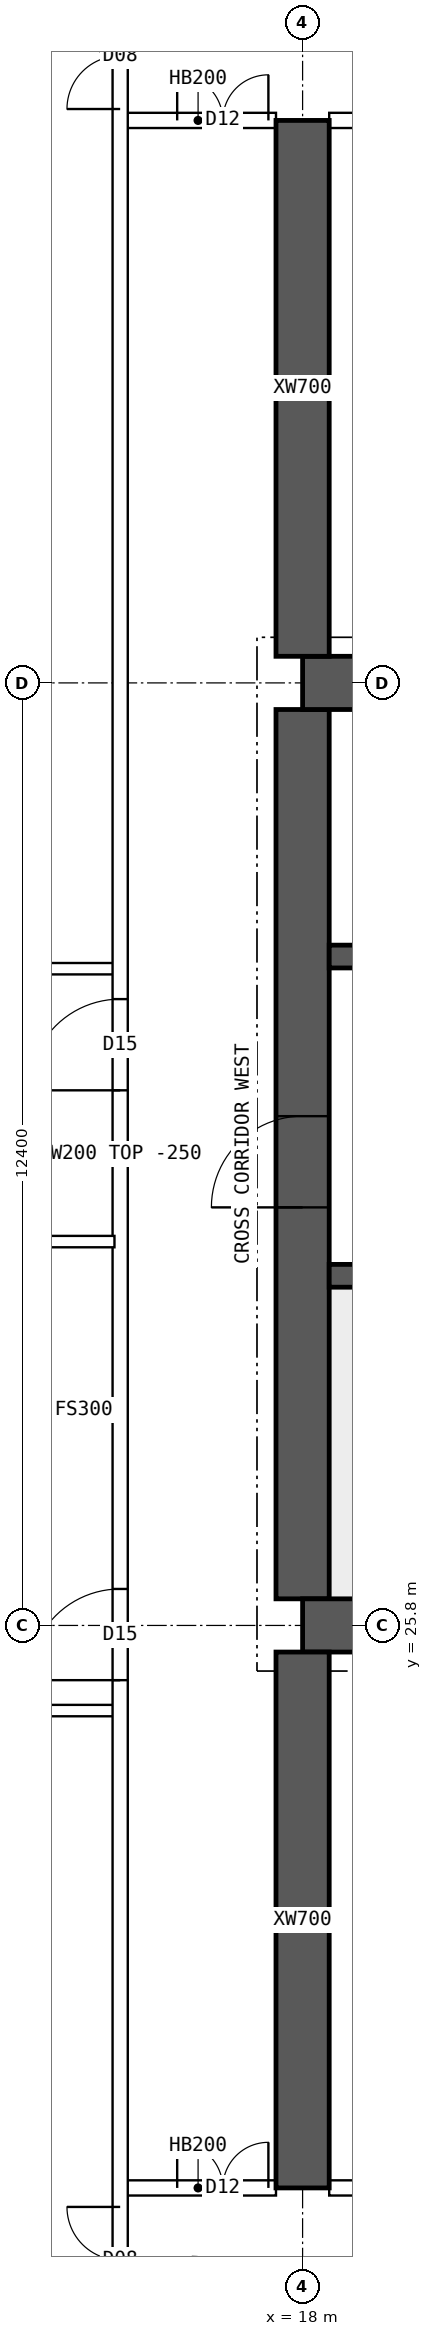
"""IFC4 building model, lengths in metres.
Left out: names, types, materials, properties, quantities, classifications, styles, units other than length and angle.
Written with IfcOpenShell. Run it as: python <this file> out.ifc"""

import sys

from ifc_helpers import new_model, si_unit, direction, frame, frame_2d, origin, place, context, subcontext, project, spatial, polyline, rectangle, outline, extrude, element, fill, save


model = new_model("IFC4")
c1 = context("Model", 3, precision=1e-05, world=origin(), true_north=direction((0.0, 1.0)))
c2 = subcontext(c1, "Body", "Model", "MODEL_VIEW")
j1 = project(units=[si_unit("LENGTHUNIT", "METRE"), si_unit("PLANEANGLEUNIT", "RADIAN")], contexts=[c1])
p1 = place(None, origin())
s1 = spatial("IfcSite", under=j1, at=p1, CompositionType="ELEMENT")
p2 = place(p1, origin())
s2 = spatial("IfcBuilding", under=s1, at=p2, CompositionType="ELEMENT")
p3 = place(p2, frame((0.0, 0.0, 208.3)))
s3 = spatial("IfcBuildingStorey", under=s2, at=p3, CompositionType="ELEMENT", Elevation=208.3)
for number, where, z_axis, x_axis in (
    (1, (18.0, 25.8, 0.0), (0.0, 0.0, 1.0), (1.0, 0.0, 0.0)),
    (2, (18.0, 38.2, 0.0), (0.0, 0.0, 1.0), (1.0, 0.0, 0.0)),
):
    element("IfcWall", number, at=place(p3, frame(where, z_axis=z_axis, x_axis=x_axis)), inside=s3, PredefinedType="SHEAR", context=c2, shape_type="SweptSolid", body=[
        extrude(rectangle(XDim=48.0, YDim=0.7, at=frame_2d((24.0, 0.0))), origin(), (0.0, 0.0, 1.0), 4.5),
    ])
p4 = place(p3, frame((18.0, 26.15, 0.0), z_axis=(0.0, 0.0, 1.0), x_axis=(0.0, 1.0, 0.0)))
e3 = element("IfcWall", 3, at=p4, inside=s3, PredefinedType="SHEAR", context=c2, shape_type="SweptSolid", body=[
    extrude(rectangle(XDim=11.7, YDim=0.7, at=frame_2d((5.85, 0.0))), origin(), (0.0, 0.0, 1.0), 4.5),
])
p5 = place(p4, frame((5.15, 0.0, 0.0)))
e4 = element("IfcOpeningElement", 4, at=p5, cuts=e3, PredefinedType="OPENING", context=c2, shape_type="SweptSolid", body=[
    extrude(rectangle(XDim=1.2, YDim=2.1, at=frame_2d((0.6, 1.05))), frame((0.0, 0.36, 0.0), z_axis=(0.0, -1.0, 0.0), x_axis=(1.0, 0.0, 0.0)), (0.0, 0.0, 1.0), 0.72),
])
p6 = place(p3, frame((18.35, 30.4, 0.0), z_axis=(0.0, 0.0, 1.0), x_axis=(1.0, 0.0, 0.0)))
e5 = element("IfcWall", 5, at=p6, inside=s3, PredefinedType="SHEAR", context=c2, shape_type="SweptSolid", body=[
    extrude(rectangle(XDim=47.3, YDim=0.3, at=frame_2d((23.65, 0.0))), origin(), (0.0, 0.0, 1.0), 4.5),
])
p7 = place(p6, frame((0.4, 0.0, 0.0)))
e6 = element("IfcOpeningElement", 6, at=p7, cuts=e5, PredefinedType="OPENING", context=c2, shape_type="SweptSolid", body=[
    extrude(rectangle(XDim=1.0, YDim=2.1, at=frame_2d((0.5, 1.05))), frame((0.0, 0.16, 0.0), z_axis=(0.0, -1.0, 0.0), x_axis=(1.0, 0.0, 0.0)), (0.0, 0.0, 1.0), 0.32),
])
p8 = place(p6, frame((45.9, 0.0, 0.0)))
e7 = element("IfcOpeningElement", 7, at=p8, cuts=e5, PredefinedType="OPENING", context=c2, shape_type="SweptSolid", body=[
    extrude(rectangle(XDim=1.0, YDim=2.1, at=frame_2d((0.5, 1.05))), frame((0.0, 0.16, 0.0), z_axis=(0.0, -1.0, 0.0), x_axis=(1.0, 0.0, 0.0)), (0.0, 0.0, 1.0), 0.32),
])
p9 = place(p6, frame((8.4, 0.0, 0.0)))
e8 = element("IfcOpeningElement", 8, at=p9, cuts=e5, PredefinedType="OPENING", context=c2, shape_type="SweptSolid", body=[
    extrude(rectangle(XDim=1.1, YDim=2.1, at=frame_2d((0.55, 1.05))), frame((0.0, 0.16, 0.0), z_axis=(0.0, -1.0, 0.0), x_axis=(1.0, 0.0, 0.0)), (0.0, 0.0, 1.0), 0.32),
])
p10 = place(p6, frame((11.0, 0.0, 0.0)))
e9 = element("IfcOpeningElement", 9, at=p10, cuts=e5, PredefinedType="OPENING", context=c2, shape_type="SweptSolid", body=[
    extrude(rectangle(XDim=1.1, YDim=2.1, at=frame_2d((0.55, 1.05))), frame((0.0, 0.16, 0.0), z_axis=(0.0, -1.0, 0.0), x_axis=(1.0, 0.0, 0.0)), (0.0, 0.0, 1.0), 0.32),
])
p11 = place(p6, frame((13.6, 0.0, 0.0)))
e10 = element("IfcOpeningElement", 10, at=p11, cuts=e5, PredefinedType="OPENING", context=c2, shape_type="SweptSolid", body=[
    extrude(rectangle(XDim=1.1, YDim=2.1, at=frame_2d((0.55, 1.05))), frame((0.0, 0.16, 0.0), z_axis=(0.0, -1.0, 0.0), x_axis=(1.0, 0.0, 0.0)), (0.0, 0.0, 1.0), 0.32),
])
p12 = place(p6, frame((16.2, 0.0, 0.0)))
e11 = element("IfcOpeningElement", 11, at=p12, cuts=e5, PredefinedType="OPENING", context=c2, shape_type="SweptSolid", body=[
    extrude(rectangle(XDim=1.1, YDim=2.1, at=frame_2d((0.55, 1.05))), frame((0.0, 0.16, 0.0), z_axis=(0.0, -1.0, 0.0), x_axis=(1.0, 0.0, 0.0)), (0.0, 0.0, 1.0), 0.32),
])
p13 = place(p6, frame((18.975, 0.0, 0.0)))
e12 = element("IfcOpeningElement", 12, at=p13, cuts=e5, PredefinedType="OPENING", context=c2, shape_type="SweptSolid", body=[
    extrude(rectangle(XDim=0.9, YDim=2.1, at=frame_2d((0.45, 1.05))), frame((0.0, 0.16, 0.0), z_axis=(0.0, -1.0, 0.0), x_axis=(1.0, 0.0, 0.0)), (0.0, 0.0, 1.0), 0.32),
])
p14 = place(p6, frame((24.375, 0.0, 0.0)))
e13 = element("IfcOpeningElement", 13, at=p14, cuts=e5, PredefinedType="OPENING", context=c2, shape_type="SweptSolid", body=[
    extrude(rectangle(XDim=1.1, YDim=2.1, at=frame_2d((0.55, 1.05))), frame((0.0, 0.16, 0.0), z_axis=(0.0, -1.0, 0.0), x_axis=(1.0, 0.0, 0.0)), (0.0, 0.0, 1.0), 0.32),
])
p15 = place(p6, frame((27.125, 0.0, 0.0)))
e14 = element("IfcOpeningElement", 14, at=p15, cuts=e5, PredefinedType="OPENING", context=c2, shape_type="SweptSolid", body=[
    extrude(rectangle(XDim=1.1, YDim=2.1, at=frame_2d((0.55, 1.05))), frame((0.0, 0.16, 0.0), z_axis=(0.0, -1.0, 0.0), x_axis=(1.0, 0.0, 0.0)), (0.0, 0.0, 1.0), 0.32),
])
p16 = place(p6, frame((30.267, 0.0, 0.0)))
e15 = element("IfcOpeningElement", 15, at=p16, cuts=e5, PredefinedType="OPENING", context=c2, shape_type="SweptSolid", body=[
    extrude(rectangle(XDim=1.1, YDim=2.1, at=frame_2d((0.55, 1.05))), frame((0.0, 0.16, 0.0), z_axis=(0.0, -1.0, 0.0), x_axis=(1.0, 0.0, 0.0)), (0.0, 0.0, 1.0), 0.32),
])
p17 = place(p6, frame((33.8, 0.0, 0.0)))
e16 = element("IfcOpeningElement", 16, at=p17, cuts=e5, PredefinedType="OPENING", context=c2, shape_type="SweptSolid", body=[
    extrude(rectangle(XDim=1.1, YDim=2.1, at=frame_2d((0.55, 1.05))), frame((0.0, 0.16, 0.0), z_axis=(0.0, -1.0, 0.0), x_axis=(1.0, 0.0, 0.0)), (0.0, 0.0, 1.0), 0.32),
])
p18 = place(p6, frame((37.333, 0.0, 0.0)))
e17 = element("IfcOpeningElement", 17, at=p18, cuts=e5, PredefinedType="OPENING", context=c2, shape_type="SweptSolid", body=[
    extrude(rectangle(XDim=1.1, YDim=2.1, at=frame_2d((0.55, 1.05))), frame((0.0, 0.16, 0.0), z_axis=(0.0, -1.0, 0.0), x_axis=(1.0, 0.0, 0.0)), (0.0, 0.0, 1.0), 0.32),
])
p19 = place(p3, frame((18.35, 34.6, 0.0), z_axis=(0.0, 0.0, 1.0), x_axis=(1.0, 0.0, 0.0)))
e18 = element("IfcWall", 18, at=p19, inside=s3, PredefinedType="SHEAR", context=c2, shape_type="SweptSolid", body=[
    extrude(rectangle(XDim=47.3, YDim=0.3, at=frame_2d((23.65, 0.0))), origin(), (0.0, 0.0, 1.0), 4.5),
])
p20 = place(p19, frame((0.9, 0.0, 0.0)))
e19 = element("IfcOpeningElement", 19, at=p20, cuts=e18, PredefinedType="OPENING", context=c2, shape_type="SweptSolid", body=[
    extrude(rectangle(XDim=1.1, YDim=2.1, at=frame_2d((0.55, 1.05))), frame((0.0, 0.16, 0.0), z_axis=(0.0, -1.0, 0.0), x_axis=(1.0, 0.0, 0.0)), (0.0, 0.0, 1.0), 0.32),
])
p21 = place(p19, frame((45.3, 0.0, 0.0)))
e20 = element("IfcOpeningElement", 20, at=p21, cuts=e18, PredefinedType="OPENING", context=c2, shape_type="SweptSolid", body=[
    extrude(rectangle(XDim=1.1, YDim=2.1, at=frame_2d((0.55, 1.05))), frame((0.0, 0.16, 0.0), z_axis=(0.0, -1.0, 0.0), x_axis=(1.0, 0.0, 0.0)), (0.0, 0.0, 1.0), 0.32),
])
p22 = place(p19, frame((4.25, 0.0, 0.0)))
e21 = element("IfcOpeningElement", 21, at=p22, cuts=e18, PredefinedType="OPENING", context=c2, shape_type="SweptSolid", body=[
    extrude(rectangle(XDim=0.9, YDim=2.1, at=frame_2d((0.45, 1.05))), frame((0.0, 0.16, 0.0), z_axis=(0.0, -1.0, 0.0), x_axis=(1.0, 0.0, 0.0)), (0.0, 0.0, 1.0), 0.32),
])
p23 = place(p19, frame((42.15, 0.0, 0.0)))
e22 = element("IfcOpeningElement", 22, at=p23, cuts=e18, PredefinedType="OPENING", context=c2, shape_type="SweptSolid", body=[
    extrude(rectangle(XDim=0.9, YDim=2.1, at=frame_2d((0.45, 1.05))), frame((0.0, 0.16, 0.0), z_axis=(0.0, -1.0, 0.0), x_axis=(1.0, 0.0, 0.0)), (0.0, 0.0, 1.0), 0.32),
])
p24 = place(p19, frame((9.025, 0.0, 0.0)))
e23 = element("IfcOpeningElement", 23, at=p24, cuts=e18, PredefinedType="OPENING", context=c2, shape_type="SweptSolid", body=[
    extrude(rectangle(XDim=0.9, YDim=2.1, at=frame_2d((0.45, 1.05))), frame((0.0, 0.16, 0.0), z_axis=(0.0, -1.0, 0.0), x_axis=(1.0, 0.0, 0.0)), (0.0, 0.0, 1.0), 0.32),
])
p25 = place(p19, frame((12.999, 0.0, 0.0)))
e24 = element("IfcOpeningElement", 24, at=p25, cuts=e18, PredefinedType="OPENING", context=c2, shape_type="SweptSolid", body=[
    extrude(rectangle(XDim=0.9, YDim=2.1, at=frame_2d((0.45, 1.05))), frame((0.0, 0.16, 0.0), z_axis=(0.0, -1.0, 0.0), x_axis=(1.0, 0.0, 0.0)), (0.0, 0.0, 1.0), 0.32),
])
p26 = place(p19, frame((16.646, 0.0, 0.0)))
e25 = element("IfcOpeningElement", 25, at=p26, cuts=e18, PredefinedType="OPENING", context=c2, shape_type="SweptSolid", body=[
    extrude(rectangle(XDim=0.9, YDim=2.1, at=frame_2d((0.45, 1.05))), frame((0.0, 0.16, 0.0), z_axis=(0.0, -1.0, 0.0), x_axis=(1.0, 0.0, 0.0)), (0.0, 0.0, 1.0), 0.32),
])
p27 = place(p19, frame((20.405, 0.0, 0.0)))
e26 = element("IfcOpeningElement", 26, at=p27, cuts=e18, PredefinedType="OPENING", context=c2, shape_type="SweptSolid", body=[
    extrude(rectangle(XDim=0.9, YDim=2.1, at=frame_2d((0.45, 1.05))), frame((0.0, 0.16, 0.0), z_axis=(0.0, -1.0, 0.0), x_axis=(1.0, 0.0, 0.0)), (0.0, 0.0, 1.0), 0.32),
])
p28 = place(p19, frame((24.811, 0.0, 0.0)))
e27 = element("IfcOpeningElement", 27, at=p28, cuts=e18, PredefinedType="OPENING", context=c2, shape_type="SweptSolid", body=[
    extrude(rectangle(XDim=0.9, YDim=2.1, at=frame_2d((0.45, 1.05))), frame((0.0, 0.16, 0.0), z_axis=(0.0, -1.0, 0.0), x_axis=(1.0, 0.0, 0.0)), (0.0, 0.0, 1.0), 0.32),
])
p29 = place(p19, frame((27.608, 0.0, 0.0)))
e28 = element("IfcOpeningElement", 28, at=p29, cuts=e18, PredefinedType="OPENING", context=c2, shape_type="SweptSolid", body=[
    extrude(rectangle(XDim=0.9, YDim=2.1, at=frame_2d((0.45, 1.05))), frame((0.0, 0.16, 0.0), z_axis=(0.0, -1.0, 0.0), x_axis=(1.0, 0.0, 0.0)), (0.0, 0.0, 1.0), 0.32),
])
p30 = place(p19, frame((29.981, 0.0, 0.0)))
e29 = element("IfcOpeningElement", 29, at=p30, cuts=e18, PredefinedType="OPENING", context=c2, shape_type="SweptSolid", body=[
    extrude(rectangle(XDim=0.9, YDim=2.1, at=frame_2d((0.45, 1.05))), frame((0.0, 0.16, 0.0), z_axis=(0.0, -1.0, 0.0), x_axis=(1.0, 0.0, 0.0)), (0.0, 0.0, 1.0), 0.32),
])
p31 = place(p19, frame((35.451, 0.0, 0.0)))
e30 = element("IfcOpeningElement", 30, at=p31, cuts=e18, PredefinedType="OPENING", context=c2, shape_type="SweptSolid", body=[
    extrude(rectangle(XDim=0.9, YDim=2.1, at=frame_2d((0.45, 1.05))), frame((0.0, 0.16, 0.0), z_axis=(0.0, -1.0, 0.0), x_axis=(1.0, 0.0, 0.0)), (0.0, 0.0, 1.0), 0.32),
])
for number, where, z_axis, x_axis in (
    (31, (18.0, 18.4, 0.0), (0.0, 0.0, 1.0), (0.0, 1.0, 0.0)),
    (32, (18.0, 38.55, 0.0), (0.0, 0.0, 1.0), (0.0, 1.0, 0.0)),
):
    element("IfcWall", number, at=place(p3, frame(where, z_axis=z_axis, x_axis=x_axis)), inside=s3, PredefinedType="SHEAR", context=c2, shape_type="SweptSolid", body=[
        extrude(rectangle(XDim=7.05, YDim=0.7, at=frame_2d((3.525, 0.0))), origin(), (0.0, 0.0, 1.0), 4.5),
    ])
p32 = place(p3, frame((15.6, 18.4, 0.0), z_axis=(0.0, 0.0, 1.0), x_axis=(1.0, 0.0, 0.0)))
e33 = element("IfcWall", 33, at=p32, inside=s3, PredefinedType="SOLIDWALL", context=c2, shape_type="SweptSolid", body=[
    extrude(rectangle(XDim=2.05, YDim=0.2, at=frame_2d((1.025, 0.0))), origin(), (0.0, 0.0, 1.0), 4.25),
])
p33 = place(p32, frame((0.75, 0.0, 0.0)))
e34 = element("IfcOpeningElement", 34, at=p33, cuts=e33, PredefinedType="OPENING", context=c2, shape_type="SweptSolid", body=[
    extrude(rectangle(XDim=1.2, YDim=2.1, at=frame_2d((0.6, 1.05))), frame((0.0, 0.11, 0.0), z_axis=(0.0, -1.0, 0.0), x_axis=(1.0, 0.0, 0.0)), (0.0, 0.0, 1.0), 0.22),
])
p34 = place(p3, frame((18.35, 18.4, 0.0), z_axis=(0.0, 0.0, 1.0), x_axis=(1.0, 0.0, 0.0)))
e35 = element("IfcWall", 35, at=p34, inside=s3, PredefinedType="SOLIDWALL", context=c2, shape_type="SweptSolid", body=[
    extrude(rectangle(XDim=5.3, YDim=0.2, at=frame_2d((2.65, 0.0))), origin(), (0.0, 0.0, 1.0), 4.25),
])
p35 = place(p34, frame((0.35, 0.0, 0.0)))
e36 = element("IfcOpeningElement", 36, at=p35, cuts=e35, PredefinedType="OPENING", context=c2, shape_type="SweptSolid", body=[
    extrude(rectangle(XDim=0.9, YDim=2.1, at=frame_2d((0.45, 1.05))), frame((0.0, 0.11, 0.0), z_axis=(0.0, -1.0, 0.0), x_axis=(1.0, 0.0, 0.0)), (0.0, 0.0, 1.0), 0.22),
])
p36 = place(p34, frame((3.36, 0.0, 0.0)))
e37 = element("IfcOpeningElement", 37, at=p36, cuts=e35, PredefinedType="OPENING", context=c2, shape_type="SweptSolid", body=[
    extrude(rectangle(XDim=0.9, YDim=2.1, at=frame_2d((0.45, 1.05))), frame((0.0, 0.11, 0.0), z_axis=(0.0, -1.0, 0.0), x_axis=(1.0, 0.0, 0.0)), (0.0, 0.0, 1.0), 0.22),
])
p37 = place(p3, frame((15.6, 45.6, 0.0), z_axis=(0.0, 0.0, 1.0), x_axis=(1.0, 0.0, 0.0)))
e38 = element("IfcWall", 38, at=p37, inside=s3, PredefinedType="SOLIDWALL", context=c2, shape_type="SweptSolid", body=[
    extrude(rectangle(XDim=2.05, YDim=0.2, at=frame_2d((1.025, 0.0))), origin(), (0.0, 0.0, 1.0), 4.25),
])
p38 = place(p37, frame((0.75, 0.0, 0.0)))
e39 = element("IfcOpeningElement", 39, at=p38, cuts=e38, PredefinedType="OPENING", context=c2, shape_type="SweptSolid", body=[
    extrude(rectangle(XDim=1.2, YDim=2.1, at=frame_2d((0.6, 1.05))), frame((0.0, 0.11, 0.0), z_axis=(0.0, -1.0, 0.0), x_axis=(1.0, 0.0, 0.0)), (0.0, 0.0, 1.0), 0.22),
])
p39 = place(p3, frame((18.35, 45.6, 0.0), z_axis=(0.0, 0.0, 1.0), x_axis=(1.0, 0.0, 0.0)))
e40 = element("IfcWall", 40, at=p39, inside=s3, PredefinedType="SOLIDWALL", context=c2, shape_type="SweptSolid", body=[
    extrude(rectangle(XDim=5.3, YDim=0.2, at=frame_2d((2.65, 0.0))), origin(), (0.0, 0.0, 1.0), 4.25),
])
p40 = place(p39, frame((0.8, 0.0, 0.0)))
e41 = element("IfcOpeningElement", 41, at=p40, cuts=e40, PredefinedType="OPENING", context=c2, shape_type="SweptSolid", body=[
    extrude(rectangle(XDim=1.0, YDim=2.1, at=frame_2d((0.5, 1.05))), frame((0.0, 0.11, 0.0), z_axis=(0.0, -1.0, 0.0), x_axis=(1.0, 0.0, 0.0)), (0.0, 0.0, 1.0), 0.22),
])
p41 = place(p3, frame((8.705, 30.85, 0.0), z_axis=(0.0, 0.0, 1.0), x_axis=(1.0, 0.0, 0.0)))
e42 = element("IfcWall", 42, at=p41, inside=s3, PredefinedType="PARTITIONING", context=c2, shape_type="SweptSolid", body=[
    extrude(outline(polyline([(0.0, 0.0), (6.82, 0.0), (6.82, 4.25), (3.597, 4.25), (3.595, 3.8), (2.997, 3.8), (2.995, 4.25), (0.0, 4.25), (0.0, 0.0)])), frame((0.0, 0.075, 0.0), z_axis=(0.0, -1.0, 0.0), x_axis=(1.0, 0.0, 0.0)), (0.0, 0.0, 1.0), 0.15),
])
p42 = place(p3, frame((15.6, 11.646, 0.0), z_axis=(0.0, 0.0, 1.0), x_axis=(0.0, 1.0, 0.0)))
e43 = element("IfcWall", 43, at=p42, inside=s3, PredefinedType="SOLIDWALL", context=c2, shape_type="SweptSolid", body=[
    extrude(rectangle(XDim=40.708, YDim=0.2, at=frame_2d((20.354, 0.0))), origin(), (0.0, 0.0, 1.0), 4.25),
])
p43 = place(p42, frame((13.434, 0.0, 0.0)))
e44 = element("IfcOpeningElement", 44, at=p43, cuts=e43, PredefinedType="OPENING", context=c2, shape_type="SweptSolid", body=[
    extrude(rectangle(XDim=1.2, YDim=2.1, at=frame_2d((0.6, 1.05))), frame((0.0, 0.11, 0.0), z_axis=(0.0, -1.0, 0.0), x_axis=(1.0, 0.0, 0.0)), (0.0, 0.0, 1.0), 0.22),
])
p44 = place(p42, frame((21.194, 0.0, 0.0)))
e45 = element("IfcOpeningElement", 45, at=p44, cuts=e43, PredefinedType="OPENING", context=c2, shape_type="SweptSolid", body=[
    extrude(rectangle(XDim=1.2, YDim=2.1, at=frame_2d((0.6, 1.05))), frame((0.0, 0.11, 0.0), z_axis=(0.0, -1.0, 0.0), x_axis=(1.0, 0.0, 0.0)), (0.0, 0.0, 1.0), 0.22),
])
p45 = place(p42, frame((5.104, 0.0, 0.0)))
e46 = element("IfcOpeningElement", 46, at=p45, cuts=e43, PredefinedType="OPENING", context=c2, shape_type="SweptSolid", body=[
    extrude(rectangle(XDim=1.4, YDim=2.1, at=frame_2d((0.7, 1.05))), frame((0.0, 0.11, 0.0), z_axis=(0.0, -1.0, 0.0), x_axis=(1.0, 0.0, 0.0)), (0.0, 0.0, 1.0), 0.22),
])
p46 = place(p42, frame((34.104, 0.0, 0.0)))
e47 = element("IfcOpeningElement", 47, at=p46, cuts=e43, PredefinedType="OPENING", context=c2, shape_type="SweptSolid", body=[
    extrude(rectangle(XDim=1.4, YDim=2.1, at=frame_2d((0.7, 1.05))), frame((0.0, 0.11, 0.0), z_axis=(0.0, -1.0, 0.0), x_axis=(1.0, 0.0, 0.0)), (0.0, 0.0, 1.0), 0.22),
])
p47 = place(p3, frame((8.705, 24.68, 0.0), z_axis=(0.0, 0.0, 1.0), x_axis=(1.0, 0.0, 0.0)))
e48 = element("IfcWall", 48, at=p47, inside=s3, PredefinedType="PARTITIONING", context=c2, shape_type="SweptSolid", body=[
    extrude(rectangle(XDim=6.82, YDim=0.15, at=frame_2d((3.41, 0.0))), origin(), (0.0, 0.0, 1.0), 4.25),
])
p48 = place(p3, frame((8.705, 34.44, 0.0), z_axis=(0.0, 0.0, 1.0), x_axis=(1.0, 0.0, 0.0)))
e49 = element("IfcWall", 49, at=p48, inside=s3, PredefinedType="PARTITIONING", context=c2, shape_type="SweptSolid", body=[
    extrude(outline(polyline([(0.0, 0.0), (6.82, 0.0), (6.82, 4.25), (3.597, 4.25), (3.595, 3.8), (2.997, 3.8), (2.995, 4.25), (0.0, 4.25), (0.0, 0.0)])), frame((0.0, 0.075, 0.0), z_axis=(0.0, -1.0, 0.0), x_axis=(1.0, 0.0, 0.0)), (0.0, 0.0, 1.0), 0.15),
])
p49 = place(p5, origin())
e50 = element("IfcDoor", 50, at=p49, inside=s3, OperationType="SINGLE_SWING_LEFT", PredefinedType="DOOR", context=c2, shape_type="SweptSolid", body=[
    extrude(rectangle(XDim=1.2, YDim=2.1, at=frame_2d((0.6, 1.05))), frame((0.0, 0.025, 0.0), z_axis=(0.0, -1.0, 0.0), x_axis=(1.0, 0.0, 0.0)), (0.0, 0.0, 1.0), 0.05),
])
fill(e4, e50)
p50 = place(p33, origin())
e51 = element("IfcDoor", 51, at=p50, inside=s3, OperationType="DOUBLE_DOOR_SINGLE_SWING", PredefinedType="DOOR", context=c2, shape_type="SweptSolid", body=[
    extrude(rectangle(XDim=1.2, YDim=2.1, at=frame_2d((0.6, 1.05))), frame((0.0, 0.025, 0.0), z_axis=(0.0, -1.0, 0.0), x_axis=(1.0, 0.0, 0.0)), (0.0, 0.0, 1.0), 0.05),
])
fill(e34, e51)
p51 = place(p38, origin())
e52 = element("IfcDoor", 52, at=p51, inside=s3, OperationType="DOUBLE_DOOR_SINGLE_SWING", PredefinedType="DOOR", context=c2, shape_type="SweptSolid", body=[
    extrude(rectangle(XDim=1.2, YDim=2.1, at=frame_2d((0.6, 1.05))), frame((0.0, 0.025, 0.0), z_axis=(0.0, -1.0, 0.0), x_axis=(1.0, 0.0, 0.0)), (0.0, 0.0, 1.0), 0.05),
])
fill(e39, e52)
p52 = place(p43, origin())
e53 = element("IfcDoor", 53, at=p52, inside=s3, OperationType="SINGLE_SWING_LEFT", PredefinedType="DOOR", context=c2, shape_type="SweptSolid", body=[
    extrude(rectangle(XDim=1.2, YDim=2.1, at=frame_2d((0.6, 1.05))), frame((0.0, 0.025, 0.0), z_axis=(0.0, -1.0, 0.0), x_axis=(1.0, 0.0, 0.0)), (0.0, 0.0, 1.0), 0.05),
])
fill(e44, e53)
p53 = place(p44, origin())
e54 = element("IfcDoor", 54, at=p53, inside=s3, OperationType="SINGLE_SWING_LEFT", PredefinedType="DOOR", context=c2, shape_type="SweptSolid", body=[
    extrude(rectangle(XDim=1.2, YDim=2.1, at=frame_2d((0.6, 1.05))), frame((0.0, 0.025, 0.0), z_axis=(0.0, -1.0, 0.0), x_axis=(1.0, 0.0, 0.0)), (0.0, 0.0, 1.0), 0.05),
])
fill(e45, e54)
p54 = place(p45, origin())
e55 = element("IfcDoor", 55, at=p54, inside=s3, OperationType="DOUBLE_DOOR_SINGLE_SWING", PredefinedType="DOOR", context=c2, shape_type="SweptSolid", body=[
    extrude(rectangle(XDim=1.4, YDim=2.1, at=frame_2d((0.7, 1.05))), frame((0.0, 0.025, 0.0), z_axis=(0.0, -1.0, 0.0), x_axis=(1.0, 0.0, 0.0)), (0.0, 0.0, 1.0), 0.05),
])
fill(e46, e55)
p55 = place(p46, origin())
e56 = element("IfcDoor", 56, at=p55, inside=s3, OperationType="DOUBLE_DOOR_SINGLE_SWING", PredefinedType="DOOR", context=c2, shape_type="SweptSolid", body=[
    extrude(rectangle(XDim=1.4, YDim=2.1, at=frame_2d((0.7, 1.05))), frame((0.0, 0.025, 0.0), z_axis=(0.0, -1.0, 0.0), x_axis=(1.0, 0.0, 0.0)), (0.0, 0.0, 1.0), 0.05),
])
fill(e47, e56)
save(model, sys.argv[1])
